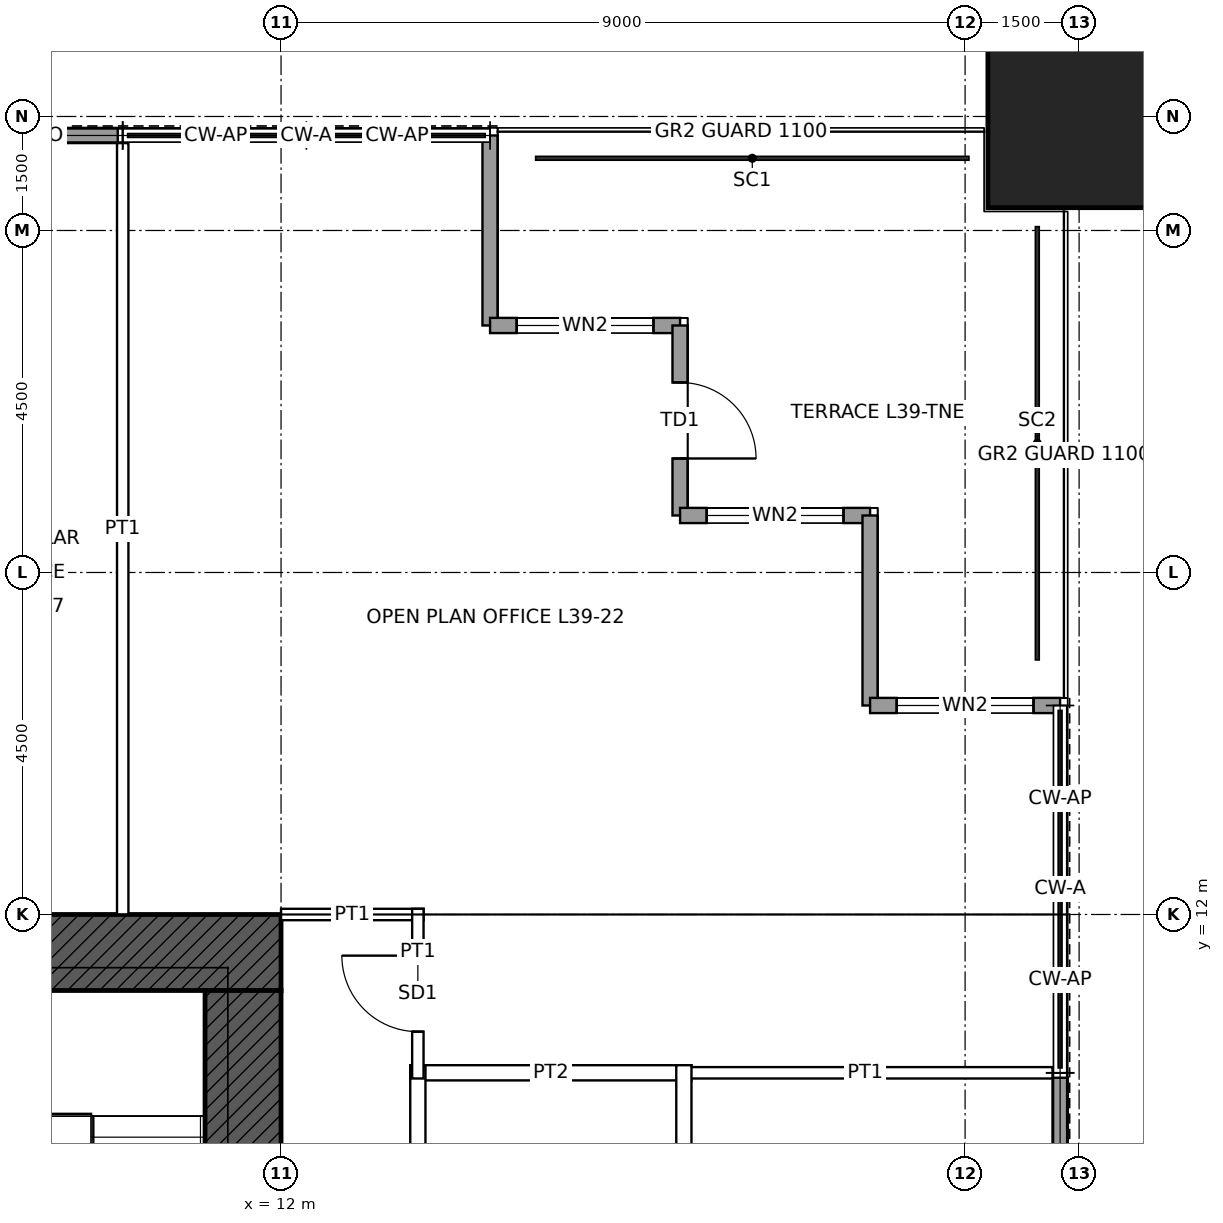
"""IFC4 building model, lengths in metres.
Left out: names, types, materials, properties, quantities, classifications, styles, units other than length and angle.
Written with IfcOpenShell. Run it as: python <this file> out.ifc"""

import sys

from ifc_helpers import new_model, si_unit, direction, frame, frame_2d, origin, origin_2d, place, context, subcontext, project, spatial, rectangle, hollow_rectangle, extrude, element, fill, save


model = new_model("IFC4")
c1 = context("Model", 3, precision=1e-05, world=origin(), true_north=direction((0.0, 1.0)))
c2 = subcontext(c1, "Body", "Model", "MODEL_VIEW")
j1 = project(units=[si_unit("LENGTHUNIT", "METRE"), si_unit("PLANEANGLEUNIT", "RADIAN")], contexts=[c1])
p1 = place(None, origin())
s1 = spatial("IfcSite", under=j1, at=p1, CompositionType="ELEMENT")
p2 = place(p1, origin())
s2 = spatial("IfcBuilding", under=s1, at=p2, CompositionType="ELEMENT")
p3 = place(p2, frame((0.0, 0.0, 189.9)))
s3 = spatial("IfcBuildingStorey", under=s2, at=p3, CompositionType="ELEMENT", Elevation=189.9)
p4 = place(p3, frame((22.5, 22.5, 0.0), z_axis=(0.0, 0.0, 1.0), x_axis=(1.0, 0.0, 0.0)))
e1 = element("IfcColumn", 1, at=p4, inside=s3, PredefinedType="COLUMN", context=c2, shape_type="SweptSolid", body=[
    extrude(hollow_rectangle(XDim=2.4, YDim=2.4, WallThickness=0.12, at=origin_2d()), origin(), (0.0, 0.0, 1.0), 4.0),
])
p5 = place(p3, frame((-12.0, 11.5, 0.0), z_axis=(0.0, 0.0, 1.0), x_axis=(1.0, 0.0, 0.0)))
e2 = element("IfcWall", 2, at=p5, inside=s3, PredefinedType="SHEAR", context=c2, shape_type="SweptSolid", body=[
    extrude(rectangle(XDim=24.0, YDim=1.0, at=frame_2d((12.0, 0.0))), origin(), (0.0, 0.0, 1.0), 4.0),
])
p6 = place(p5, frame((6.25, 0.0, 0.0)))
e3 = element("IfcOpeningElement", 3, at=p6, cuts=e2, PredefinedType="OPENING", context=c2, shape_type="SweptSolid", body=[
    extrude(rectangle(XDim=1.0, YDim=2.4, at=frame_2d((0.5, 1.2))), frame((0.0, 0.51, 0.0), z_axis=(0.0, -1.0, 0.0), x_axis=(1.0, 0.0, 0.0)), (0.0, 0.0, 1.0), 1.02),
])
p7 = place(p5, frame((16.75, 0.0, 0.0)))
e4 = element("IfcOpeningElement", 4, at=p7, cuts=e2, PredefinedType="OPENING", context=c2, shape_type="SweptSolid", body=[
    extrude(rectangle(XDim=1.0, YDim=2.4, at=frame_2d((0.5, 1.2))), frame((0.0, 0.51, 0.0), z_axis=(0.0, -1.0, 0.0), x_axis=(1.0, 0.0, 0.0)), (0.0, 0.0, 1.0), 1.02),
])
p8 = place(p3, frame((11.5, 11.0, 0.0), z_axis=(0.0, 0.0, 1.0), x_axis=(0.0, -1.0, 0.0)))
e5 = element("IfcWall", 5, at=p8, inside=s3, PredefinedType="SHEAR", context=c2, shape_type="SweptSolid", body=[
    extrude(rectangle(XDim=22.0, YDim=1.0, at=frame_2d((11.0, 0.0))), origin(), (0.0, 0.0, 1.0), 4.0),
])
p9 = place(p8, frame((10.5, 0.0, 0.0)))
e6 = element("IfcOpeningElement", 6, at=p9, cuts=e5, PredefinedType="OPENING", context=c2, shape_type="SweptSolid", body=[
    extrude(rectangle(XDim=1.0, YDim=2.4, at=frame_2d((0.5, 1.2))), frame((0.0, 0.51, 0.0), z_axis=(0.0, -1.0, 0.0), x_axis=(1.0, 0.0, 0.0)), (0.0, 0.0, 1.0), 1.02),
])
p10 = place(p3, frame((14.75, 22.25, 0.0), z_axis=(0.0, 0.0, 1.0), x_axis=(0.0, -1.0, 0.0)))
e7 = element("IfcWall", 7, at=p10, inside=s3, PredefinedType="SOLIDWALL", context=c2, shape_type="SweptSolid", body=[
    extrude(rectangle(XDim=2.5, YDim=0.2, at=frame_2d((1.25, 0.0))), origin(), (0.0, 0.0, 1.0), 3.85),
])
p11 = place(p3, frame((14.75, 19.75, 0.0), z_axis=(0.0, 0.0, 1.0), x_axis=(1.0, 0.0, 0.0)))
e8 = element("IfcWall", 8, at=p11, inside=s3, PredefinedType="SOLIDWALL", context=c2, shape_type="SweptSolid", body=[
    extrude(rectangle(XDim=2.5, YDim=0.2, at=frame_2d((1.25, 0.0))), origin(), (0.0, 0.0, 1.0), 3.85),
])
p12 = place(p11, frame((0.35, 0.0, 0.3)))
e9 = element("IfcOpeningElement", 9, at=p12, cuts=e8, PredefinedType="OPENING", context=c2, shape_type="SweptSolid", body=[
    extrude(rectangle(XDim=1.8, YDim=2.4, at=frame_2d((0.9, 1.2))), frame((0.0, 0.11, 0.0), z_axis=(0.0, -1.0, 0.0), x_axis=(1.0, 0.0, 0.0)), (0.0, 0.0, 1.0), 0.22),
])
p13 = place(p3, frame((17.25, 19.75, 0.0), z_axis=(0.0, 0.0, 1.0), x_axis=(0.0, -1.0, 0.0)))
e10 = element("IfcWall", 10, at=p13, inside=s3, PredefinedType="SOLIDWALL", context=c2, shape_type="SweptSolid", body=[
    extrude(rectangle(XDim=2.5, YDim=0.2, at=frame_2d((1.25, 0.0))), origin(), (0.0, 0.0, 1.0), 3.85),
])
p14 = place(p13, frame((0.75, 0.0, 0.0)))
e11 = element("IfcOpeningElement", 11, at=p14, cuts=e10, PredefinedType="OPENING", context=c2, shape_type="SweptSolid", body=[
    extrude(rectangle(XDim=1.0, YDim=2.4, at=frame_2d((0.5, 1.2))), frame((0.0, 0.11, 0.0), z_axis=(0.0, -1.0, 0.0), x_axis=(1.0, 0.0, 0.0)), (0.0, 0.0, 1.0), 0.22),
])
p15 = place(p3, frame((17.25, 17.25, 0.0), z_axis=(0.0, 0.0, 1.0), x_axis=(1.0, 0.0, 0.0)))
e12 = element("IfcWall", 12, at=p15, inside=s3, PredefinedType="SOLIDWALL", context=c2, shape_type="SweptSolid", body=[
    extrude(rectangle(XDim=2.5, YDim=0.2, at=frame_2d((1.25, 0.0))), origin(), (0.0, 0.0, 1.0), 3.85),
])
p16 = place(p15, frame((0.35, 0.0, 0.3)))
e13 = element("IfcOpeningElement", 13, at=p16, cuts=e12, PredefinedType="OPENING", context=c2, shape_type="SweptSolid", body=[
    extrude(rectangle(XDim=1.8, YDim=2.4, at=frame_2d((0.9, 1.2))), frame((0.0, 0.11, 0.0), z_axis=(0.0, -1.0, 0.0), x_axis=(1.0, 0.0, 0.0)), (0.0, 0.0, 1.0), 0.22),
])
p17 = place(p3, frame((19.75, 17.25, 0.0), z_axis=(0.0, 0.0, 1.0), x_axis=(0.0, -1.0, 0.0)))
e14 = element("IfcWall", 14, at=p17, inside=s3, PredefinedType="SOLIDWALL", context=c2, shape_type="SweptSolid", body=[
    extrude(rectangle(XDim=2.5, YDim=0.2, at=frame_2d((1.25, 0.0))), origin(), (0.0, 0.0, 1.0), 3.85),
])
p18 = place(p3, frame((19.75, 14.75, 0.0), z_axis=(0.0, 0.0, 1.0), x_axis=(1.0, 0.0, 0.0)))
e15 = element("IfcWall", 15, at=p18, inside=s3, PredefinedType="SOLIDWALL", context=c2, shape_type="SweptSolid", body=[
    extrude(rectangle(XDim=2.5, YDim=0.2, at=frame_2d((1.25, 0.0))), origin(), (0.0, 0.0, 1.0), 3.85),
])
p19 = place(p18, frame((0.35, 0.0, 0.3)))
e16 = element("IfcOpeningElement", 16, at=p19, cuts=e15, PredefinedType="OPENING", context=c2, shape_type="SweptSolid", body=[
    extrude(rectangle(XDim=1.8, YDim=2.4, at=frame_2d((0.9, 1.2))), frame((0.0, 0.11, 0.0), z_axis=(0.0, -1.0, 0.0), x_axis=(1.0, 0.0, 0.0)), (0.0, 0.0, 1.0), 0.22),
])
for number, where, z_axis, x_axis in (
    (17, (7.565, 22.25, 0.0), (0.0, 0.0, 1.0), (1.0, 0.0, 0.0)),
    (18, (22.25, 9.852, 0.0), (0.0, 0.0, 1.0), (0.0, -1.0, 0.0)),
):
    element("IfcWall", number, at=place(p3, frame(where, z_axis=z_axis, x_axis=x_axis)), inside=s3, PredefinedType="SOLIDWALL", context=c2, shape_type="SweptSolid", body=[
        extrude(rectangle(XDim=2.287, YDim=0.2, at=frame_2d((1.144, 0.0))), origin(), (0.0, 0.0, 1.0), 3.85),
    ])
p20 = place(p3, frame((13.7, 9.917, 0.0), z_axis=(0.0, 0.0, 1.0), x_axis=(1.0, 0.0, 0.0)))
e19 = element("IfcWall", 19, at=p20, inside=s3, PredefinedType="PARTITIONING", context=c2, shape_type="SweptSolid", body=[
    extrude(rectangle(XDim=3.7, YDim=0.2, at=frame_2d((1.85, 0.0))), origin(), (0.0, 0.0, 1.0), 3.85),
])
p21 = place(p3, frame((17.225, 9.917, 0.0), z_axis=(0.0, 0.0, 1.0), x_axis=(1.0, 0.0, 0.0)))
e20 = element("IfcWall", 20, at=p21, inside=s3, PredefinedType="PARTITIONING", context=c2, shape_type="SweptSolid", body=[
    extrude(rectangle(XDim=4.925, YDim=0.15, at=frame_2d((2.462, 0.0))), origin(), (0.0, 0.0, 1.0), 3.85),
])
p22 = place(p3, frame((12.0, 12.0, 0.0), z_axis=(0.0, 0.0, 1.0), x_axis=(1.0, 0.0, 0.0)))
e21 = element("IfcWall", 21, at=p22, inside=s3, PredefinedType="PARTITIONING", context=c2, shape_type="SweptSolid", body=[
    extrude(rectangle(XDim=1.875, YDim=0.15, at=frame_2d((0.938, 0.0))), origin(), (0.0, 0.0, 1.0), 2.908),
])
p23 = place(p3, frame((9.917, 12.0, 0.0), z_axis=(0.0, 0.0, 1.0), x_axis=(0.0, 1.0, 0.0)))
e22 = element("IfcWall", 22, at=p23, inside=s3, PredefinedType="PARTITIONING", context=c2, shape_type="SweptSolid", body=[
    extrude(rectangle(XDim=10.15, YDim=0.15, at=frame_2d((5.075, 0.0))), origin(), (0.0, 0.0, 1.0), 3.85),
])
p24 = place(p3, frame((13.8, 4.9, 0.0), z_axis=(0.0, 0.0, 1.0), x_axis=(0.0, 1.0, 0.0)))
e23 = element("IfcWall", 23, at=p24, inside=s3, PredefinedType="PARTITIONING", context=c2, shape_type="SweptSolid", body=[
    extrude(rectangle(XDim=5.117, YDim=0.2, at=frame_2d((2.559, 0.0))), origin(), (0.0, 0.0, 1.0), 3.85),
])
p25 = place(p3, frame((13.8, 9.842, 0.0), z_axis=(0.0, 0.0, 1.0), x_axis=(0.0, 1.0, 0.0)))
e24 = element("IfcWall", 24, at=p25, inside=s3, PredefinedType="PARTITIONING", context=c2, shape_type="SweptSolid", body=[
    extrude(rectangle(XDim=2.233, YDim=0.15, at=frame_2d((1.116, 0.0))), origin(), (0.0, 0.0, 1.0), 3.85),
])
p26 = place(p25, frame((0.616, 0.0, 0.0)))
e25 = element("IfcOpeningElement", 25, at=p26, cuts=e24, PredefinedType="OPENING", context=c2, shape_type="SweptSolid", body=[
    extrude(rectangle(XDim=1.0, YDim=2.4, at=frame_2d((0.5, 1.2))), frame((0.0, 0.085, 0.0), z_axis=(0.0, -1.0, 0.0), x_axis=(1.0, 0.0, 0.0)), (0.0, 0.0, 1.0), 0.17),
])
p27 = place(p3, frame((17.3, 4.9, 0.0), z_axis=(0.0, 0.0, 1.0), x_axis=(0.0, 1.0, 0.0)))
e26 = element("IfcWall", 26, at=p27, inside=s3, PredefinedType="PARTITIONING", context=c2, shape_type="SweptSolid", body=[
    extrude(rectangle(XDim=5.117, YDim=0.2, at=frame_2d((2.559, 0.0))), origin(), (0.0, 0.0, 1.0), 3.85),
])
p28 = place(p27, frame((2.059, 0.0, 0.0)))
e27 = element("IfcOpeningElement", 27, at=p28, cuts=e26, PredefinedType="OPENING", context=c2, shape_type="SweptSolid", body=[
    extrude(rectangle(XDim=1.0, YDim=2.1, at=frame_2d((0.5, 1.05))), frame((0.0, 0.11, 0.0), z_axis=(0.0, -1.0, 0.0), x_axis=(1.0, 0.0, 0.0)), (0.0, 0.0, 1.0), 0.22),
])
p29 = place(p12, origin())
e28 = element("IfcWindow", 28, at=p29, inside=s3, PartitioningType="SINGLE_PANEL", PredefinedType="WINDOW", context=c2, shape_type="SweptSolid", body=[
    extrude(rectangle(XDim=1.8, YDim=2.4, at=frame_2d((0.9, 1.2))), frame((0.0, 0.03, 0.0), z_axis=(0.0, -1.0, 0.0), x_axis=(1.0, 0.0, 0.0)), (0.0, 0.0, 1.0), 0.06),
])
fill(e9, e28)
p30 = place(p14, origin())
e29 = element("IfcDoor", 29, at=p30, inside=s3, OperationType="SINGLE_SWING_RIGHT", PredefinedType="DOOR", context=c2, shape_type="SweptSolid", body=[
    extrude(rectangle(XDim=1.0, YDim=2.4, at=frame_2d((0.5, 1.2))), frame((0.0, 0.025, 0.0), z_axis=(0.0, -1.0, 0.0), x_axis=(1.0, 0.0, 0.0)), (0.0, 0.0, 1.0), 0.05),
])
fill(e11, e29)
p31 = place(p16, origin())
e30 = element("IfcWindow", 30, at=p31, inside=s3, PartitioningType="SINGLE_PANEL", PredefinedType="WINDOW", context=c2, shape_type="SweptSolid", body=[
    extrude(rectangle(XDim=1.8, YDim=2.4, at=frame_2d((0.9, 1.2))), frame((0.0, 0.03, 0.0), z_axis=(0.0, -1.0, 0.0), x_axis=(1.0, 0.0, 0.0)), (0.0, 0.0, 1.0), 0.06),
])
fill(e13, e30)
p32 = place(p19, origin())
e31 = element("IfcWindow", 31, at=p32, inside=s3, PartitioningType="SINGLE_PANEL", PredefinedType="WINDOW", context=c2, shape_type="SweptSolid", body=[
    extrude(rectangle(XDim=1.8, YDim=2.4, at=frame_2d((0.9, 1.2))), frame((0.0, 0.03, 0.0), z_axis=(0.0, -1.0, 0.0), x_axis=(1.0, 0.0, 0.0)), (0.0, 0.0, 1.0), 0.06),
])
fill(e16, e31)
p33 = place(p26, origin())
e32 = element("IfcDoor", 32, at=p33, inside=s3, OperationType="SINGLE_SWING_RIGHT", PredefinedType="DOOR", context=c2, shape_type="SweptSolid", body=[
    extrude(rectangle(XDim=1.0, YDim=2.4, at=frame_2d((0.5, 1.2))), frame((0.0, 0.025, 0.0), z_axis=(0.0, -1.0, 0.0), x_axis=(1.0, 0.0, 0.0)), (0.0, 0.0, 1.0), 0.05),
])
fill(e25, e32)
save(model, sys.argv[1])
